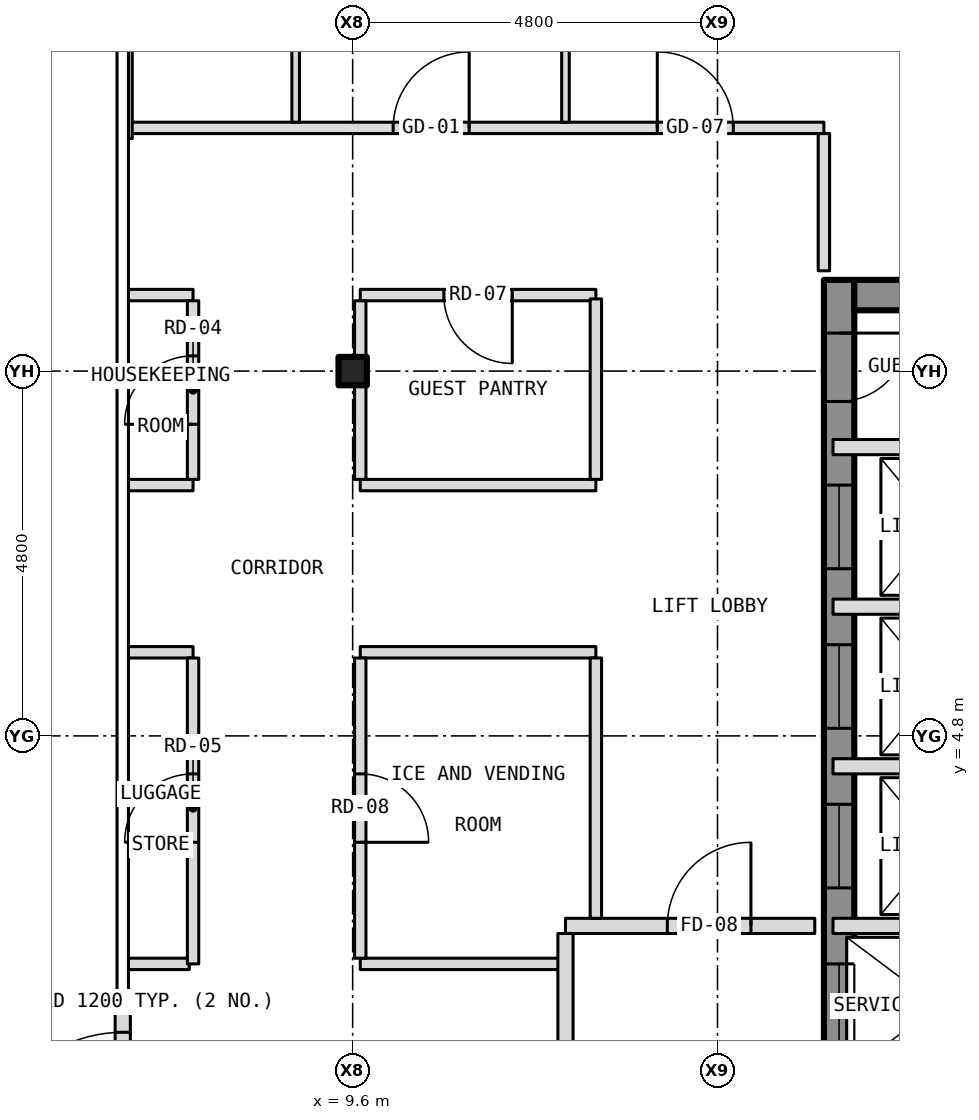
"""IFC4 building model, lengths in metres.
Left out: names, types, materials, properties, quantities, classifications, styles, units other than length and angle.
Written with IfcOpenShell. Run it as: python <this file> out.ifc"""

import sys

from ifc_helpers import new_model, si_unit, direction, frame, frame_2d, origin, origin_2d, place, context, subcontext, project, spatial, rectangle, i_section, extrude, element, fill, save


model = new_model("IFC4")
c1 = context("Model", 3, precision=1e-05, world=origin(), true_north=direction((0.0, 1.0)))
c2 = subcontext(c1, "Body", "Model", "MODEL_VIEW")
j1 = project(units=[si_unit("LENGTHUNIT", "METRE"), si_unit("PLANEANGLEUNIT", "RADIAN")], contexts=[c1])
p1 = place(None, origin())
s1 = spatial("IfcSite", under=j1, at=p1, CompositionType="ELEMENT")
p2 = place(p1, origin())
s2 = spatial("IfcBuilding", under=s1, at=p2, CompositionType="ELEMENT")
p3 = place(p2, frame((0.0, 0.0, 229.5)))
s3 = spatial("IfcBuildingStorey", under=s2, at=p3, CompositionType="ELEMENT", Elevation=229.5)
p4 = place(p3, frame((9.6, 9.6, -0.15), z_axis=(0.0, 0.0, 1.0), x_axis=(1.0, 0.0, 0.0)))
e1 = element("IfcColumn", 1, at=p4, inside=s3, PredefinedType="COLUMN", context=c2, shape_type="SweptSolid", body=[
    extrude(i_section(OverallWidth=0.373, OverallDepth=0.373, WebThickness=0.016, FlangeThickness=0.026, at=origin_2d()), origin(), (0.0, 0.0, 1.0), 3.5),
])
p5 = place(p3, frame((16.0, -10.8, 0.0), z_axis=(0.0, 0.0, 1.0), x_axis=(0.0, 1.0, 0.0)))
e2 = element("IfcWall", 2, at=p5, inside=s3, PredefinedType="SHEAR", context=c2, shape_type="SweptSolid", body=[
    extrude(rectangle(XDim=21.6, YDim=0.4, at=frame_2d((10.8, 0.0))), origin(), (0.0, 0.0, 1.0), 3.25),
])
p6 = place(p5, frame((9.4, 0.0, 0.0)))
e3 = element("IfcOpeningElement", 3, at=p6, cuts=e2, PredefinedType="OPENING", context=c2, shape_type="SweptSolid", body=[
    extrude(rectangle(XDim=1.1, YDim=2.1, at=frame_2d((0.55, 1.05))), frame((0.0, 0.212, 0.0), z_axis=(0.0, -1.0, 0.0), x_axis=(1.0, 0.0, 0.0)), (0.0, 0.0, 1.0), 0.424),
])
p7 = place(p5, frame((11.5, 0.0, 0.0)))
e4 = element("IfcOpeningElement", 4, at=p7, cuts=e2, PredefinedType="OPENING", context=c2, shape_type="SweptSolid", body=[
    extrude(rectangle(XDim=1.1, YDim=2.1, at=frame_2d((0.55, 1.05))), frame((0.0, 0.212, 0.0), z_axis=(0.0, -1.0, 0.0), x_axis=(1.0, 0.0, 0.0)), (0.0, 0.0, 1.0), 0.424),
])
p8 = place(p5, frame((13.6, 0.0, 0.0)))
e5 = element("IfcOpeningElement", 5, at=p8, cuts=e2, PredefinedType="OPENING", context=c2, shape_type="SweptSolid", body=[
    extrude(rectangle(XDim=1.1, YDim=2.1, at=frame_2d((0.55, 1.05))), frame((0.0, 0.212, 0.0), z_axis=(0.0, -1.0, 0.0), x_axis=(1.0, 0.0, 0.0)), (0.0, 0.0, 1.0), 0.424),
])
p9 = place(p5, frame((15.7, 0.0, 0.0)))
e6 = element("IfcOpeningElement", 6, at=p9, cuts=e2, PredefinedType="OPENING", context=c2, shape_type="SweptSolid", body=[
    extrude(rectangle(XDim=1.1, YDim=2.1, at=frame_2d((0.55, 1.05))), frame((0.0, 0.212, 0.0), z_axis=(0.0, -1.0, 0.0), x_axis=(1.0, 0.0, 0.0)), (0.0, 0.0, 1.0), 0.424),
])
p10 = place(p5, frame((17.8, 0.0, 0.0)))
e7 = element("IfcOpeningElement", 7, at=p10, cuts=e2, PredefinedType="OPENING", context=c2, shape_type="SweptSolid", body=[
    extrude(rectangle(XDim=1.1, YDim=2.1, at=frame_2d((0.55, 1.05))), frame((0.0, 0.212, 0.0), z_axis=(0.0, -1.0, 0.0), x_axis=(1.0, 0.0, 0.0)), (0.0, 0.0, 1.0), 0.424),
])
p11 = place(p5, frame((5.642, 0.0, 0.0)))
e8 = element("IfcOpeningElement", 8, at=p11, cuts=e2, PredefinedType="OPENING", context=c2, shape_type="SweptSolid", body=[
    extrude(rectangle(XDim=1.1, YDim=2.1, at=frame_2d((0.55, 1.05))), frame((0.0, 0.212, 0.0), z_axis=(0.0, -1.0, 0.0), x_axis=(1.0, 0.0, 0.0)), (0.0, 0.0, 1.0), 0.424),
])
p12 = place(p5, frame((7.5, 0.0, 0.0)))
e9 = element("IfcOpeningElement", 9, at=p12, cuts=e2, PredefinedType="OPENING", context=c2, shape_type="SweptSolid", body=[
    extrude(rectangle(XDim=1.1, YDim=2.1, at=frame_2d((0.55, 1.05))), frame((0.0, 0.212, 0.0), z_axis=(0.0, -1.0, 0.0), x_axis=(1.0, 0.0, 0.0)), (0.0, 0.0, 1.0), 0.424),
])
p13 = place(p5, frame((20.0, 0.0, 0.0)))
e10 = element("IfcOpeningElement", 10, at=p13, cuts=e2, PredefinedType="OPENING", context=c2, shape_type="SweptSolid", body=[
    extrude(rectangle(XDim=0.9, YDim=2.1, at=frame_2d((0.45, 1.05))), frame((0.0, 0.212, 0.0), z_axis=(0.0, -1.0, 0.0), x_axis=(1.0, 0.0, 0.0)), (0.0, 0.0, 1.0), 0.424),
])
p14 = place(p3, frame((16.2, 10.6, 0.0), z_axis=(0.0, 0.0, 1.0), x_axis=(1.0, 0.0, 0.0)))
e11 = element("IfcWall", 11, at=p14, inside=s3, PredefinedType="SHEAR", context=c2, shape_type="SweptSolid", body=[
    extrude(rectangle(XDim=3.8, YDim=0.4, at=frame_2d((1.9, 0.0))), origin(), (0.0, 0.0, 1.0), 3.25),
])
p15 = place(p3, frame((6.575, -1.4, 0.0), z_axis=(0.0, 0.0, 1.0), x_axis=(0.0, 1.0, 0.0)))
e12 = element("IfcWall", 12, at=p15, inside=s3, PredefinedType="SOLIDWALL", context=c2, shape_type="SweptSolid", body=[
    extrude(rectangle(XDim=2.8, YDim=0.2, at=frame_2d((1.4, 0.0))), origin(), (0.0, 0.0, 1.0), 3.5),
])
p16 = place(p15, frame((0.5, 0.0, 0.0)))
e13 = element("IfcOpeningElement", 13, at=p16, cuts=e12, PredefinedType="OPENING", context=c2, shape_type="SweptSolid", body=[
    extrude(rectangle(XDim=1.8, YDim=2.1, at=frame_2d((0.9, 1.05))), frame((0.0, 0.112, 0.0), z_axis=(0.0, -1.0, 0.0), x_axis=(1.0, 0.0, 0.0)), (0.0, 0.0, 1.0), 0.224),
])
p17 = place(p3, frame((6.62, 1.8, 0.0), z_axis=(0.0, 0.0, 1.0), x_axis=(1.0, 0.0, 0.0)))
e14 = element("IfcWall", 14, at=p17, inside=s3, PredefinedType="PARTITIONING", context=c2, shape_type="SweptSolid", body=[
    extrude(rectangle(XDim=0.83, YDim=0.15, at=frame_2d((0.415, 0.0))), origin(), (0.0, 0.0, 1.0), 3.35),
])
p18 = place(p3, frame((9.7, 1.8, 0.0), z_axis=(0.0, 0.0, 1.0), x_axis=(1.0, 0.0, 0.0)))
e15 = element("IfcWall", 15, at=p18, inside=s3, PredefinedType="PARTITIONING", context=c2, shape_type="SweptSolid", body=[
    extrude(rectangle(XDim=2.7, YDim=0.15, at=frame_2d((1.35, 0.0))), origin(), (0.0, 0.0, 1.0), 3.35),
])
p19 = place(p3, frame((12.4, 2.3, 0.0), z_axis=(0.0, 0.0, 1.0), x_axis=(1.0, 0.0, 0.0)))
e16 = element("IfcWall", 16, at=p19, inside=s3, PredefinedType="PARTITIONING", context=c2, shape_type="SweptSolid", body=[
    extrude(rectangle(XDim=3.28, YDim=0.2, at=frame_2d((1.64, 0.0))), origin(), (0.0, 0.0, 1.0), 3.35),
])
p20 = place(p19, frame((1.34, 0.0, 0.0)))
e17 = element("IfcOpeningElement", 17, at=p20, cuts=e16, PredefinedType="OPENING", context=c2, shape_type="SweptSolid", body=[
    extrude(rectangle(XDim=1.1, YDim=2.1, at=frame_2d((0.55, 1.05))), frame((0.0, 0.112, 0.0), z_axis=(0.0, -1.0, 0.0), x_axis=(1.0, 0.0, 0.0)), (0.0, 0.0, 1.0), 0.224),
])
for number, where, z_axis, x_axis in (
    (18, (15.92, 2.3, 0.0), (0.0, 0.0, 1.0), (1.0, 0.0, 0.0)),
    (19, (15.92, 4.4, 0.0), (0.0, 0.0, 1.0), (1.0, 0.0, 0.0)),
):
    element("IfcWall", number, at=place(p3, frame(where, z_axis=z_axis, x_axis=x_axis)), inside=s3, PredefinedType="PARTITIONING", context=c2, shape_type="SweptSolid", body=[
        extrude(rectangle(XDim=2.88, YDim=0.2, at=frame_2d((1.44, 0.0))), origin(), (0.0, 0.0, 1.0), 3.25),
    ])
p21 = place(p3, frame((6.62, 5.9, 0.0), z_axis=(0.0, 0.0, 1.0), x_axis=(1.0, 0.0, 0.0)))
e20 = element("IfcWall", 20, at=p21, inside=s3, PredefinedType="PARTITIONING", context=c2, shape_type="SweptSolid", body=[
    extrude(rectangle(XDim=0.88, YDim=0.15, at=frame_2d((0.44, 0.0))), origin(), (0.0, 0.0, 1.0), 3.35),
])
p22 = place(p3, frame((9.7, 5.9, 0.0), z_axis=(0.0, 0.0, 1.0), x_axis=(1.0, 0.0, 0.0)))
e21 = element("IfcWall", 21, at=p22, inside=s3, PredefinedType="PARTITIONING", context=c2, shape_type="SweptSolid", body=[
    extrude(rectangle(XDim=3.1, YDim=0.15, at=frame_2d((1.55, 0.0))), origin(), (0.0, 0.0, 1.0), 3.35),
])
p23 = place(p3, frame((15.92, 6.5, 0.0), z_axis=(0.0, 0.0, 1.0), x_axis=(1.0, 0.0, 0.0)))
e22 = element("IfcWall", 22, at=p23, inside=s3, PredefinedType="PARTITIONING", context=c2, shape_type="SweptSolid", body=[
    extrude(rectangle(XDim=2.88, YDim=0.2, at=frame_2d((1.44, 0.0))), origin(), (0.0, 0.0, 1.0), 3.25),
])
p24 = place(p3, frame((6.62, 8.1, 0.0), z_axis=(0.0, 0.0, 1.0), x_axis=(1.0, 0.0, 0.0)))
e23 = element("IfcWall", 23, at=p24, inside=s3, PredefinedType="PARTITIONING", context=c2, shape_type="SweptSolid", body=[
    extrude(rectangle(XDim=0.88, YDim=0.15, at=frame_2d((0.44, 0.0))), origin(), (0.0, 0.0, 1.0), 3.35),
])
p25 = place(p3, frame((9.7, 8.1, 0.0), z_axis=(0.0, 0.0, 1.0), x_axis=(1.0, 0.0, 0.0)))
e24 = element("IfcWall", 24, at=p25, inside=s3, PredefinedType="PARTITIONING", context=c2, shape_type="SweptSolid", body=[
    extrude(rectangle(XDim=3.1, YDim=0.15, at=frame_2d((1.55, 0.0))), origin(), (0.0, 0.0, 1.0), 3.35),
])
p26 = place(p3, frame((15.92, 8.6, 0.0), z_axis=(0.0, 0.0, 1.0), x_axis=(1.0, 0.0, 0.0)))
e25 = element("IfcWall", 25, at=p26, inside=s3, PredefinedType="PARTITIONING", context=c2, shape_type="SweptSolid", body=[
    extrude(rectangle(XDim=2.88, YDim=0.2, at=frame_2d((1.44, 0.0))), origin(), (0.0, 0.0, 1.0), 3.25),
])
p27 = place(p3, frame((6.62, 10.6, 0.0), z_axis=(0.0, 0.0, 1.0), x_axis=(1.0, 0.0, 0.0)))
e26 = element("IfcWall", 26, at=p27, inside=s3, PredefinedType="PARTITIONING", context=c2, shape_type="SweptSolid", body=[
    extrude(rectangle(XDim=0.88, YDim=0.15, at=frame_2d((0.44, 0.0))), origin(), (0.0, 0.0, 1.0), 3.35),
])
p28 = place(p3, frame((9.7, 10.6, 0.0), z_axis=(0.0, 0.0, 1.0), x_axis=(1.0, 0.0, 0.0)))
e27 = element("IfcWall", 27, at=p28, inside=s3, PredefinedType="PARTITIONING", context=c2, shape_type="SweptSolid", body=[
    extrude(rectangle(XDim=3.1, YDim=0.15, at=frame_2d((1.55, 0.0))), origin(), (0.0, 0.0, 1.0), 3.35),
])
p29 = place(p28, frame((1.1, 0.0, 0.0)))
e28 = element("IfcOpeningElement", 28, at=p29, cuts=e27, PredefinedType="OPENING", context=c2, shape_type="SweptSolid", body=[
    extrude(rectangle(XDim=0.9, YDim=2.1, at=frame_2d((0.45, 1.05))), frame((0.0, 0.087, 0.0), z_axis=(0.0, -1.0, 0.0), x_axis=(1.0, 0.0, 0.0)), (0.0, 0.0, 1.0), 0.174),
])
p30 = place(p3, frame((6.65, 12.8, 0.0), z_axis=(0.0, 0.0, 1.0), x_axis=(1.0, 0.0, 0.0)))
e29 = element("IfcWall", 29, at=p30, inside=s3, PredefinedType="PARTITIONING", context=c2, shape_type="SweptSolid", body=[
    extrude(rectangle(XDim=9.15, YDim=0.15, at=frame_2d((4.575, 0.0))), origin(), (0.0, 0.0, 1.0), 3.35),
])
p31 = place(p30, frame((3.483, 0.0, 0.0)))
e30 = element("IfcOpeningElement", 30, at=p31, cuts=e29, PredefinedType="OPENING", context=c2, shape_type="SweptSolid", body=[
    extrude(rectangle(XDim=1.0, YDim=2.1, at=frame_2d((0.5, 1.05))), frame((0.0, 0.087, 0.0), z_axis=(0.0, -1.0, 0.0), x_axis=(1.0, 0.0, 0.0)), (0.0, 0.0, 1.0), 0.174),
])
p32 = place(p30, frame((6.958, 0.0, 0.0)))
e31 = element("IfcOpeningElement", 31, at=p32, cuts=e29, PredefinedType="OPENING", context=c2, shape_type="SweptSolid", body=[
    extrude(rectangle(XDim=1.0, YDim=2.1, at=frame_2d((0.5, 1.05))), frame((0.0, 0.087, 0.0), z_axis=(0.0, -1.0, 0.0), x_axis=(1.0, 0.0, 0.0)), (0.0, 0.0, 1.0), 0.174),
])
p33 = place(p3, frame((6.65, 12.66, 0.0), z_axis=(0.0, 0.0, 1.0), x_axis=(0.0, 1.0, 0.0)))
e32 = element("IfcWall", 32, at=p33, inside=s3, PredefinedType="PARTITIONING", context=c2, shape_type="SweptSolid", body=[
    extrude(rectangle(XDim=3.48, YDim=0.1, at=frame_2d((1.74, 0.0))), origin(), (0.0, 0.0, 1.0), 3.35),
])
p34 = place(p3, frame((7.5, 1.8, 0.0), z_axis=(0.0, 0.0, 1.0), x_axis=(0.0, 1.0, 0.0)))
e33 = element("IfcWall", 33, at=p34, inside=s3, PredefinedType="PARTITIONING", context=c2, shape_type="SweptSolid", body=[
    extrude(rectangle(XDim=4.025, YDim=0.15, at=frame_2d((2.012, 0.0))), origin(), (0.0, 0.0, 1.0), 3.35),
])
p35 = place(p34, frame((1.6, 0.0, 0.0)))
e34 = element("IfcOpeningElement", 34, at=p35, cuts=e33, PredefinedType="OPENING", context=c2, shape_type="SweptSolid", body=[
    extrude(rectangle(XDim=0.9, YDim=2.1, at=frame_2d((0.45, 1.05))), frame((0.0, 0.087, 0.0), z_axis=(0.0, -1.0, 0.0), x_axis=(1.0, 0.0, 0.0)), (0.0, 0.0, 1.0), 0.174),
])
p36 = place(p3, frame((7.5, 8.175, 0.0), z_axis=(0.0, 0.0, 1.0), x_axis=(0.0, 1.0, 0.0)))
e35 = element("IfcWall", 35, at=p36, inside=s3, PredefinedType="PARTITIONING", context=c2, shape_type="SweptSolid", body=[
    extrude(rectangle(XDim=2.35, YDim=0.15, at=frame_2d((1.175, 0.0))), origin(), (0.0, 0.0, 1.0), 3.35),
])
p37 = place(p36, frame((0.725, 0.0, 0.0)))
e36 = element("IfcOpeningElement", 36, at=p37, cuts=e35, PredefinedType="OPENING", context=c2, shape_type="SweptSolid", body=[
    extrude(rectangle(XDim=0.9, YDim=2.1, at=frame_2d((0.45, 1.05))), frame((0.0, 0.087, 0.0), z_axis=(0.0, -1.0, 0.0), x_axis=(1.0, 0.0, 0.0)), (0.0, 0.0, 1.0), 0.174),
])
p38 = place(p3, frame((8.85, 12.875, 0.0), z_axis=(0.0, 0.0, 1.0), x_axis=(0.0, 1.0, 0.0)))
e37 = element("IfcWall", 37, at=p38, inside=s3, PredefinedType="PARTITIONING", context=c2, shape_type="SweptSolid", body=[
    extrude(rectangle(XDim=3.075, YDim=0.1, at=frame_2d((1.538, 0.0))), origin(), (0.0, 0.0, 1.0), 3.35),
])
p39 = place(p38, frame((1.971, 0.0, 0.0)))
e38 = element("IfcOpeningElement", 38, at=p39, cuts=e37, PredefinedType="OPENING", context=c2, shape_type="SweptSolid", body=[
    extrude(rectangle(XDim=0.9, YDim=2.1, at=frame_2d((0.45, 1.05))), frame((0.0, 0.062, 0.0), z_axis=(0.0, -1.0, 0.0), x_axis=(1.0, 0.0, 0.0)), (0.0, 0.0, 1.0), 0.124),
])
p40 = place(p3, frame((9.7, 1.875, 0.0), z_axis=(0.0, 0.0, 1.0), x_axis=(0.0, 1.0, 0.0)))
e39 = element("IfcWall", 39, at=p40, inside=s3, PredefinedType="PARTITIONING", context=c2, shape_type="SweptSolid", body=[
    extrude(rectangle(XDim=3.95, YDim=0.15, at=frame_2d((1.975, 0.0))), origin(), (0.0, 0.0, 1.0), 2.728),
])
p41 = place(p40, frame((1.525, 0.0, 0.0)))
e40 = element("IfcOpeningElement", 40, at=p41, cuts=e39, PredefinedType="OPENING", context=c2, shape_type="SweptSolid", body=[
    extrude(rectangle(XDim=0.9, YDim=2.1, at=frame_2d((0.45, 1.05))), frame((0.0, 0.087, 0.0), z_axis=(0.0, -1.0, 0.0), x_axis=(1.0, 0.0, 0.0)), (0.0, 0.0, 1.0), 0.174),
])
p42 = place(p3, frame((9.7, 8.175, 0.0), z_axis=(0.0, 0.0, 1.0), x_axis=(0.0, 1.0, 0.0)))
e41 = element("IfcWall", 41, at=p42, inside=s3, PredefinedType="PARTITIONING", context=c2, shape_type="SweptSolid", body=[
    extrude(rectangle(XDim=1.238, YDim=0.15, at=frame_2d((0.619, 0.0))), origin(), (0.0, 0.0, 1.0), 2.728),
])
p43 = place(p3, frame((9.7, 9.413, 0.0), z_axis=(0.0, 0.0, 1.0), x_axis=(0.0, 1.0, 0.0)))
e42 = element("IfcWall", 42, at=p43, inside=s3, PredefinedType="PARTITIONING", context=c2, shape_type="SweptSolid", body=[
    extrude(rectangle(XDim=0.374, YDim=0.15, at=frame_2d((0.187, 0.0))), origin(), (0.0, 0.0, 1.0), 3.35),
])
p44 = place(p3, frame((9.7, 9.787, 0.0), z_axis=(0.0, 0.0, 1.0), x_axis=(0.0, 1.0, 0.0)))
e43 = element("IfcWall", 43, at=p44, inside=s3, PredefinedType="PARTITIONING", context=c2, shape_type="SweptSolid", body=[
    extrude(rectangle(XDim=0.738, YDim=0.15, at=frame_2d((0.369, 0.0))), origin(), (0.0, 0.0, 1.0), 2.728),
])
p45 = place(p3, frame((12.4, -1.8, 0.0), z_axis=(0.0, 0.0, 1.0), x_axis=(0.0, 1.0, 0.0)))
e44 = element("IfcWall", 44, at=p45, inside=s3, PredefinedType="PARTITIONING", context=c2, shape_type="SweptSolid", body=[
    extrude(rectangle(XDim=4.0, YDim=0.2, at=frame_2d((2.0, 0.0))), origin(), (0.0, 0.0, 1.0), 3.35),
])
p46 = place(p45, frame((1.25, 0.0, 0.0)))
e45 = element("IfcOpeningElement", 45, at=p46, cuts=e44, PredefinedType="OPENING", context=c2, shape_type="SweptSolid", body=[
    extrude(rectangle(XDim=1.1, YDim=2.1, at=frame_2d((0.55, 1.05))), frame((0.0, 0.112, 0.0), z_axis=(0.0, -1.0, 0.0), x_axis=(1.0, 0.0, 0.0)), (0.0, 0.0, 1.0), 0.224),
])
p47 = place(p3, frame((12.4, 12.875, 0.0), z_axis=(0.0, 0.0, 1.0), x_axis=(0.0, 1.0, 0.0)))
e46 = element("IfcWall", 46, at=p47, inside=s3, PredefinedType="PARTITIONING", context=c2, shape_type="SweptSolid", body=[
    extrude(rectangle(XDim=7.905, YDim=0.1, at=frame_2d((3.953, 0.0))), origin(), (0.0, 0.0, 1.0), 3.35),
])
p48 = place(p3, frame((12.8, 2.4, 0.0), z_axis=(0.0, 0.0, 1.0), x_axis=(0.0, 1.0, 0.0)))
e47 = element("IfcWall", 47, at=p48, inside=s3, PredefinedType="PARTITIONING", context=c2, shape_type="SweptSolid", body=[
    extrude(rectangle(XDim=3.425, YDim=0.15, at=frame_2d((1.712, 0.0))), origin(), (0.0, 0.0, 1.0), 3.35),
])
p49 = place(p3, frame((12.8, 8.175, 0.0), z_axis=(0.0, 0.0, 1.0), x_axis=(0.0, 1.0, 0.0)))
e48 = element("IfcWall", 48, at=p49, inside=s3, PredefinedType="PARTITIONING", context=c2, shape_type="SweptSolid", body=[
    extrude(rectangle(XDim=2.375, YDim=0.15, at=frame_2d((1.188, 0.0))), origin(), (0.0, 0.0, 1.0), 3.35),
])
p50 = place(p3, frame((15.8, 10.92, 0.0), z_axis=(0.0, 0.0, 1.0), x_axis=(0.0, 1.0, 0.0)))
e49 = element("IfcWall", 49, at=p50, inside=s3, PredefinedType="PARTITIONING", context=c2, shape_type="SweptSolid", body=[
    extrude(rectangle(XDim=1.805, YDim=0.15, at=frame_2d((0.903, 0.0))), origin(), (0.0, 0.0, 1.0), 3.35),
])
p51 = place(p16, origin())
e50 = element("IfcDoor", 50, at=p51, inside=s3, OperationType="DOUBLE_DOOR_DOUBLE_SWING", PredefinedType="DOOR", context=c2, shape_type="SweptSolid", body=[
    extrude(rectangle(XDim=1.8, YDim=2.1, at=frame_2d((0.9, 1.05))), frame((0.0, 0.025, 0.0), z_axis=(0.0, -1.0, 0.0), x_axis=(1.0, 0.0, 0.0)), (0.0, 0.0, 1.0), 0.05),
])
fill(e13, e50)
p52 = place(p7, origin())
e51 = element("IfcDoor", 51, at=p52, inside=s3, OperationType="SLIDING_TO_LEFT", PredefinedType="DOOR", context=c2, shape_type="SweptSolid", body=[
    extrude(rectangle(XDim=1.1, YDim=2.1, at=frame_2d((0.55, 1.05))), frame((0.0, 0.025, 0.0), z_axis=(0.0, -1.0, 0.0), x_axis=(1.0, 0.0, 0.0)), (0.0, 0.0, 1.0), 0.05),
])
fill(e4, e51)
p53 = place(p8, origin())
e52 = element("IfcDoor", 52, at=p53, inside=s3, OperationType="SLIDING_TO_LEFT", PredefinedType="DOOR", context=c2, shape_type="SweptSolid", body=[
    extrude(rectangle(XDim=1.1, YDim=2.1, at=frame_2d((0.55, 1.05))), frame((0.0, 0.025, 0.0), z_axis=(0.0, -1.0, 0.0), x_axis=(1.0, 0.0, 0.0)), (0.0, 0.0, 1.0), 0.05),
])
fill(e5, e52)
p54 = place(p9, origin())
e53 = element("IfcDoor", 53, at=p54, inside=s3, OperationType="SLIDING_TO_LEFT", PredefinedType="DOOR", context=c2, shape_type="SweptSolid", body=[
    extrude(rectangle(XDim=1.1, YDim=2.1, at=frame_2d((0.55, 1.05))), frame((0.0, 0.025, 0.0), z_axis=(0.0, -1.0, 0.0), x_axis=(1.0, 0.0, 0.0)), (0.0, 0.0, 1.0), 0.05),
])
fill(e6, e53)
p55 = place(p10, origin())
e54 = element("IfcDoor", 54, at=p55, inside=s3, OperationType="SLIDING_TO_LEFT", PredefinedType="DOOR", context=c2, shape_type="SweptSolid", body=[
    extrude(rectangle(XDim=1.1, YDim=2.1, at=frame_2d((0.55, 1.05))), frame((0.0, 0.025, 0.0), z_axis=(0.0, -1.0, 0.0), x_axis=(1.0, 0.0, 0.0)), (0.0, 0.0, 1.0), 0.05),
])
fill(e7, e54)
p56 = place(p13, origin())
e55 = element("IfcDoor", 55, at=p56, inside=s3, OperationType="SINGLE_SWING_RIGHT", PredefinedType="DOOR", context=c2, shape_type="SweptSolid", body=[
    extrude(rectangle(XDim=0.9, YDim=2.1, at=frame_2d((0.45, 1.05))), frame((0.0, 0.025, 0.0), z_axis=(0.0, -1.0, 0.0), x_axis=(1.0, 0.0, 0.0)), (0.0, 0.0, 1.0), 0.05),
])
fill(e10, e55)
p57 = place(p20, origin())
e56 = element("IfcDoor", 56, at=p57, inside=s3, OperationType="SINGLE_SWING_RIGHT", PredefinedType="DOOR", context=c2, shape_type="SweptSolid", body=[
    extrude(rectangle(XDim=1.1, YDim=2.1, at=frame_2d((0.55, 1.05))), frame((0.0, 0.025, 0.0), z_axis=(0.0, -1.0, 0.0), x_axis=(1.0, 0.0, 0.0)), (0.0, 0.0, 1.0), 0.05),
])
fill(e17, e56)
p58 = place(p31, origin())
e57 = element("IfcDoor", 57, at=p58, inside=s3, OperationType="SINGLE_SWING_RIGHT", PredefinedType="DOOR", context=c2, shape_type="SweptSolid", body=[
    extrude(rectangle(XDim=1.0, YDim=2.1, at=frame_2d((0.5, 1.05))), frame((0.0, 0.025, 0.0), z_axis=(0.0, -1.0, 0.0), x_axis=(1.0, 0.0, 0.0)), (0.0, 0.0, 1.0), 0.05),
])
fill(e30, e57)
p59 = place(p32, origin())
e58 = element("IfcDoor", 58, at=p59, inside=s3, OperationType="SINGLE_SWING_LEFT", PredefinedType="DOOR", context=c2, shape_type="SweptSolid", body=[
    extrude(rectangle(XDim=1.0, YDim=2.1, at=frame_2d((0.5, 1.05))), frame((0.0, 0.025, 0.0), z_axis=(0.0, -1.0, 0.0), x_axis=(1.0, 0.0, 0.0)), (0.0, 0.0, 1.0), 0.05),
])
fill(e31, e58)
p60 = place(p37, origin())
e59 = element("IfcDoor", 59, at=p60, inside=s3, OperationType="SINGLE_SWING_LEFT", PredefinedType="DOOR", context=c2, shape_type="SweptSolid", body=[
    extrude(rectangle(XDim=0.9, YDim=2.1, at=frame_2d((0.45, 1.05))), frame((0.0, 0.025, 0.0), z_axis=(0.0, -1.0, 0.0), x_axis=(1.0, 0.0, 0.0)), (0.0, 0.0, 1.0), 0.05),
])
fill(e36, e59)
p61 = place(p35, origin())
e60 = element("IfcDoor", 60, at=p61, inside=s3, OperationType="SINGLE_SWING_LEFT", PredefinedType="DOOR", context=c2, shape_type="SweptSolid", body=[
    extrude(rectangle(XDim=0.9, YDim=2.1, at=frame_2d((0.45, 1.05))), frame((0.0, 0.025, 0.0), z_axis=(0.0, -1.0, 0.0), x_axis=(1.0, 0.0, 0.0)), (0.0, 0.0, 1.0), 0.05),
])
fill(e34, e60)
p62 = place(p29, origin())
e61 = element("IfcDoor", 61, at=p62, inside=s3, OperationType="SINGLE_SWING_RIGHT", PredefinedType="DOOR", context=c2, shape_type="SweptSolid", body=[
    extrude(rectangle(XDim=0.9, YDim=2.1, at=frame_2d((0.45, 1.05))), frame((0.0, 0.025, 0.0), z_axis=(0.0, -1.0, 0.0), x_axis=(1.0, 0.0, 0.0)), (0.0, 0.0, 1.0), 0.05),
])
fill(e28, e61)
p63 = place(p41, origin())
e62 = element("IfcDoor", 62, at=p63, inside=s3, OperationType="SINGLE_SWING_LEFT", PredefinedType="DOOR", context=c2, shape_type="SweptSolid", body=[
    extrude(rectangle(XDim=0.9, YDim=2.1, at=frame_2d((0.45, 1.05))), frame((0.0, 0.025, 0.0), z_axis=(0.0, -1.0, 0.0), x_axis=(1.0, 0.0, 0.0)), (0.0, 0.0, 1.0), 0.05),
])
fill(e40, e62)
save(model, sys.argv[1])
